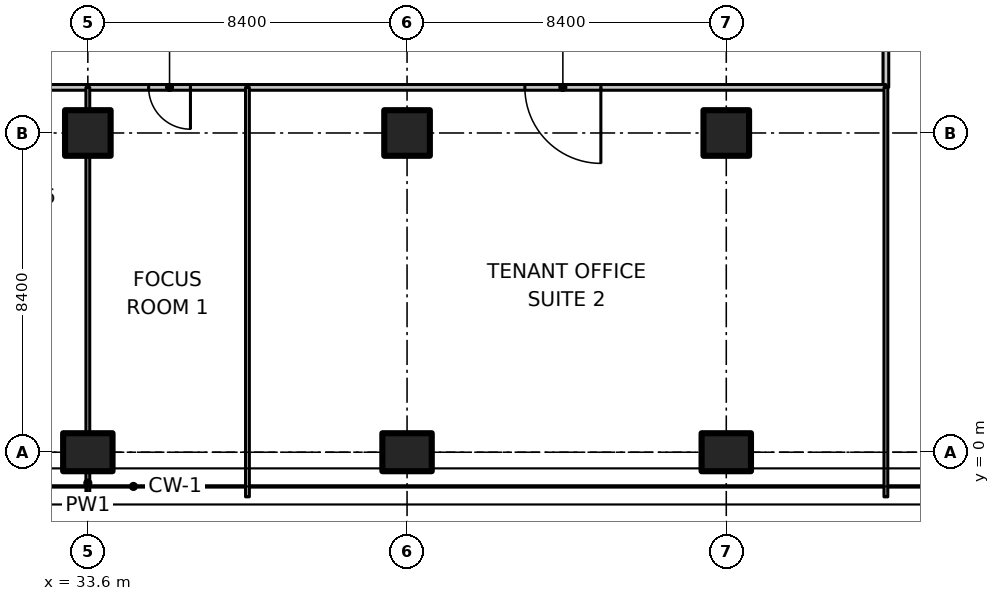
"""IFC4 building model, lengths in metres.
Left out: names, types, materials, properties, quantities, classifications, styles, units other than length and angle.
Written with IfcOpenShell. Run it as: python <this file> out.ifc"""

import sys

from ifc_helpers import new_model, si_unit, direction, frame, frame_2d, origin, origin_2d, place, context, subcontext, project, spatial, polyline, rectangle, outline, extrude, element, fill, save


model = new_model("IFC4")
c1 = context("Model", 3, precision=1e-05, world=origin(), true_north=direction((0.0, 1.0)))
c2 = subcontext(c1, "Body", "Model", "MODEL_VIEW")
j1 = project(units=[si_unit("LENGTHUNIT", "METRE"), si_unit("PLANEANGLEUNIT", "RADIAN")], contexts=[c1])
p1 = place(None, origin())
s1 = spatial("IfcSite", under=j1, at=p1, CompositionType="ELEMENT")
p2 = place(p1, origin())
s2 = spatial("IfcBuilding", under=s1, at=p2, CompositionType="ELEMENT")
p3 = place(p2, frame((0.0, 0.0, 91.7)))
s3 = spatial("IfcBuildingStorey", under=s2, at=p3, CompositionType="ELEMENT", Elevation=91.7)
p4 = place(p3, frame((33.6, 0.0, 0.0), z_axis=(0.0, 0.0, 1.0), x_axis=(0.0, 1.0, 0.0)))
e1 = element("IfcColumn", 1, at=p4, inside=s3, PredefinedType="COLUMN", context=c2, shape_type="SweptSolid", body=[
    extrude(rectangle(XDim=1.0, YDim=1.3, at=origin_2d()), origin(), (0.0, 0.0, 1.0), 3.35),
])
p5 = place(p3, frame((33.6, 8.4, 0.0), z_axis=(0.0, 0.0, 1.0), x_axis=(1.0, 0.0, 0.0)))
e2 = element("IfcColumn", 2, at=p5, inside=s3, PredefinedType="COLUMN", context=c2, shape_type="SweptSolid", body=[
    extrude(rectangle(XDim=1.2, YDim=1.2, at=origin_2d()), origin(), (0.0, 0.0, 1.0), 3.35),
])
p6 = place(p3, frame((42.0, 0.0, 0.0), z_axis=(0.0, 0.0, 1.0), x_axis=(0.0, 1.0, 0.0)))
e3 = element("IfcColumn", 3, at=p6, inside=s3, PredefinedType="COLUMN", context=c2, shape_type="SweptSolid", body=[
    extrude(rectangle(XDim=1.0, YDim=1.3, at=origin_2d()), origin(), (0.0, 0.0, 1.0), 3.35),
])
p7 = place(p3, frame((42.0, 8.4, 0.0), z_axis=(0.0, 0.0, 1.0), x_axis=(1.0, 0.0, 0.0)))
e4 = element("IfcColumn", 4, at=p7, inside=s3, PredefinedType="COLUMN", context=c2, shape_type="SweptSolid", body=[
    extrude(rectangle(XDim=1.2, YDim=1.2, at=origin_2d()), origin(), (0.0, 0.0, 1.0), 3.35),
])
p8 = place(p3, frame((50.4, 0.0, 0.0), z_axis=(0.0, 0.0, 1.0), x_axis=(0.0, 1.0, 0.0)))
e5 = element("IfcColumn", 5, at=p8, inside=s3, PredefinedType="COLUMN", context=c2, shape_type="SweptSolid", body=[
    extrude(rectangle(XDim=1.0, YDim=1.3, at=origin_2d()), origin(), (0.0, 0.0, 1.0), 3.35),
])
p9 = place(p3, frame((50.4, 8.4, 0.0), z_axis=(0.0, 0.0, 1.0), x_axis=(1.0, 0.0, 0.0)))
e6 = element("IfcColumn", 6, at=p9, inside=s3, PredefinedType="COLUMN", context=c2, shape_type="SweptSolid", body=[
    extrude(rectangle(XDim=1.2, YDim=1.2, at=origin_2d()), origin(), (0.0, 0.0, 1.0), 3.35),
])
p10 = place(p3, frame((54.6, 13.0, 0.0), z_axis=(0.0, 0.0, 1.0), x_axis=(0.0, -1.0, 0.0)))
e7 = element("IfcWall", 7, at=p10, inside=s3, PredefinedType="PARTITIONING", context=c2, shape_type="SweptSolid", body=[
    extrude(rectangle(XDim=3.4, YDim=0.15, at=frame_2d((1.7, 0.0))), origin(), (0.0, 0.0, 1.0), 3.33),
])
p11 = place(p3, frame((33.6, 9.6, 0.0), z_axis=(0.0, 0.0, 1.0), x_axis=(-1.0, 0.0, 0.0)))
e8 = element("IfcWall", 8, at=p11, inside=s3, PredefinedType="PARTITIONING", context=c2, shape_type="SweptSolid", body=[
    extrude(rectangle(XDim=4.2, YDim=0.15, at=frame_2d((2.1, 0.0))), origin(), (0.0, 0.0, 1.0), 3.33),
])
p12 = place(p11, frame((1.2, 0.0, 0.0)))
e9 = element("IfcOpeningElement", 9, at=p12, cuts=e8, PredefinedType="OPENING", context=c2, shape_type="SweptSolid", body=[
    extrude(rectangle(XDim=1.6, YDim=2.1, at=frame_2d((0.8, 1.05))), frame((0.0, 0.085, 0.0), z_axis=(0.0, -1.0, 0.0), x_axis=(1.0, 0.0, 0.0)), (0.0, 0.0, 1.0), 0.17),
])
p13 = place(p3, frame((37.8, 9.6, 0.0), z_axis=(0.0, 0.0, 1.0), x_axis=(-1.0, 0.0, 0.0)))
e10 = element("IfcWall", 10, at=p13, inside=s3, PredefinedType="PARTITIONING", context=c2, shape_type="SweptSolid", body=[
    extrude(rectangle(XDim=4.2, YDim=0.15, at=frame_2d((2.1, 0.0))), origin(), (0.0, 0.0, 1.0), 3.33),
])
p14 = place(p13, frame((1.5, 0.0, 0.0)))
e11 = element("IfcOpeningElement", 11, at=p14, cuts=e10, PredefinedType="OPENING", context=c2, shape_type="SweptSolid", body=[
    extrude(rectangle(XDim=1.1, YDim=2.1, at=frame_2d((0.55, 1.05))), frame((0.0, 0.085, 0.0), z_axis=(0.0, -1.0, 0.0), x_axis=(1.0, 0.0, 0.0)), (0.0, 0.0, 1.0), 0.17),
])
p15 = place(p3, frame((54.6, 9.6, 0.0), z_axis=(0.0, 0.0, 1.0), x_axis=(-1.0, 0.0, 0.0)))
e12 = element("IfcWall", 12, at=p15, inside=s3, PredefinedType="PARTITIONING", context=c2, shape_type="SweptSolid", body=[
    extrude(rectangle(XDim=16.8, YDim=0.15, at=frame_2d((8.4, 0.0))), origin(), (0.0, 0.0, 1.0), 3.33),
])
p16 = place(p15, frame((7.5, 0.0, 0.0)))
e13 = element("IfcOpeningElement", 13, at=p16, cuts=e12, PredefinedType="OPENING", context=c2, shape_type="SweptSolid", body=[
    extrude(rectangle(XDim=2.0, YDim=2.4, at=frame_2d((1.0, 1.2))), frame((0.0, 0.085, 0.0), z_axis=(0.0, -1.0, 0.0), x_axis=(1.0, 0.0, 0.0)), (0.0, 0.0, 1.0), 0.17),
])
p17 = place(p3, frame((54.6, -1.174, 0.0), z_axis=(0.0, 0.0, 1.0), x_axis=(0.0, 1.0, 0.0)))
e14 = element("IfcWall", 14, at=p17, inside=s3, PredefinedType="PARTITIONING", context=c2, shape_type="SweptSolid", body=[
    extrude(outline(polyline([(0.0, 0.0), (10.774, 0.0), (10.774, 3.33), (1.624, 3.33), (1.622, 2.98), (0.726, 2.98), (0.724, 3.33), (0.074, 3.33), (0.0, 3.33), (0.0, 0.0)])), frame((0.0, 0.05, 0.0), z_axis=(0.0, -1.0, 0.0), x_axis=(1.0, 0.0, 0.0)), (0.0, 0.0, 1.0), 0.1),
])
p18 = place(p3, frame((33.6, 9.6, 0.0), z_axis=(0.0, 0.0, 1.0), x_axis=(0.0, -1.0, 0.0)))
e15 = element("IfcWall", 15, at=p18, inside=s3, PredefinedType="PARTITIONING", context=c2, shape_type="SweptSolid", body=[
    extrude(rectangle(XDim=0.58, YDim=0.1, at=frame_2d((0.29, 0.0))), origin(), (0.0, 0.0, 1.0), 3.33),
])
p19 = place(p3, frame((33.6, 7.78, 0.0), z_axis=(0.0, 0.0, 1.0), x_axis=(0.0, -1.0, 0.0)))
e16 = element("IfcWall", 16, at=p19, inside=s3, PredefinedType="PARTITIONING", context=c2, shape_type="SweptSolid", body=[
    extrude(rectangle(XDim=7.26, YDim=0.1, at=frame_2d((3.63, 0.0))), origin(), (0.0, 0.0, 1.0), 3.33),
])
p20 = place(p3, frame((33.6, -0.52, 0.0), z_axis=(0.0, 0.0, 1.0), x_axis=(0.0, -1.0, 0.0)))
e17 = element("IfcWall", 17, at=p20, inside=s3, PredefinedType="PARTITIONING", context=c2, shape_type="SweptSolid", body=[
    extrude(rectangle(XDim=0.58, YDim=0.1, at=frame_2d((0.29, 0.0))), origin(), (0.0, 0.0, 1.0), 3.33),
])
p21 = place(p3, frame((37.8, 9.6, 0.0), z_axis=(0.0, 0.0, 1.0), x_axis=(0.0, -1.0, 0.0)))
e18 = element("IfcWall", 18, at=p21, inside=s3, PredefinedType="PARTITIONING", context=c2, shape_type="SweptSolid", body=[
    extrude(outline(polyline([(0.0, 0.0), (10.774, 0.0), (10.774, 3.33), (10.7, 3.33), (10.05, 3.33), (10.048, 2.98), (9.152, 2.98), (9.15, 3.33), (0.0, 3.33), (0.0, 0.0)])), frame((0.0, 0.05, 0.0), z_axis=(0.0, -1.0, 0.0), x_axis=(1.0, 0.0, 0.0)), (0.0, 0.0, 1.0), 0.1),
])
p22 = place(p14, origin())
e19 = element("IfcDoor", 19, at=p22, inside=s3, OperationType="SINGLE_SWING_LEFT", PredefinedType="DOOR", context=c2, shape_type="SweptSolid", body=[
    extrude(rectangle(XDim=1.1, YDim=2.1, at=frame_2d((0.55, 1.05))), frame((0.0, 0.025, 0.0), z_axis=(0.0, -1.0, 0.0), x_axis=(1.0, 0.0, 0.0)), (0.0, 0.0, 1.0), 0.05),
])
fill(e11, e19)
p23 = place(p16, origin())
e20 = element("IfcDoor", 20, at=p23, inside=s3, OperationType="DOUBLE_DOOR_SINGLE_SWING", PredefinedType="DOOR", context=c2, shape_type="SweptSolid", body=[
    extrude(rectangle(XDim=2.0, YDim=2.4, at=frame_2d((1.0, 1.2))), frame((0.0, 0.025, 0.0), z_axis=(0.0, -1.0, 0.0), x_axis=(1.0, 0.0, 0.0)), (0.0, 0.0, 1.0), 0.05),
])
fill(e13, e20)
save(model, sys.argv[1])
